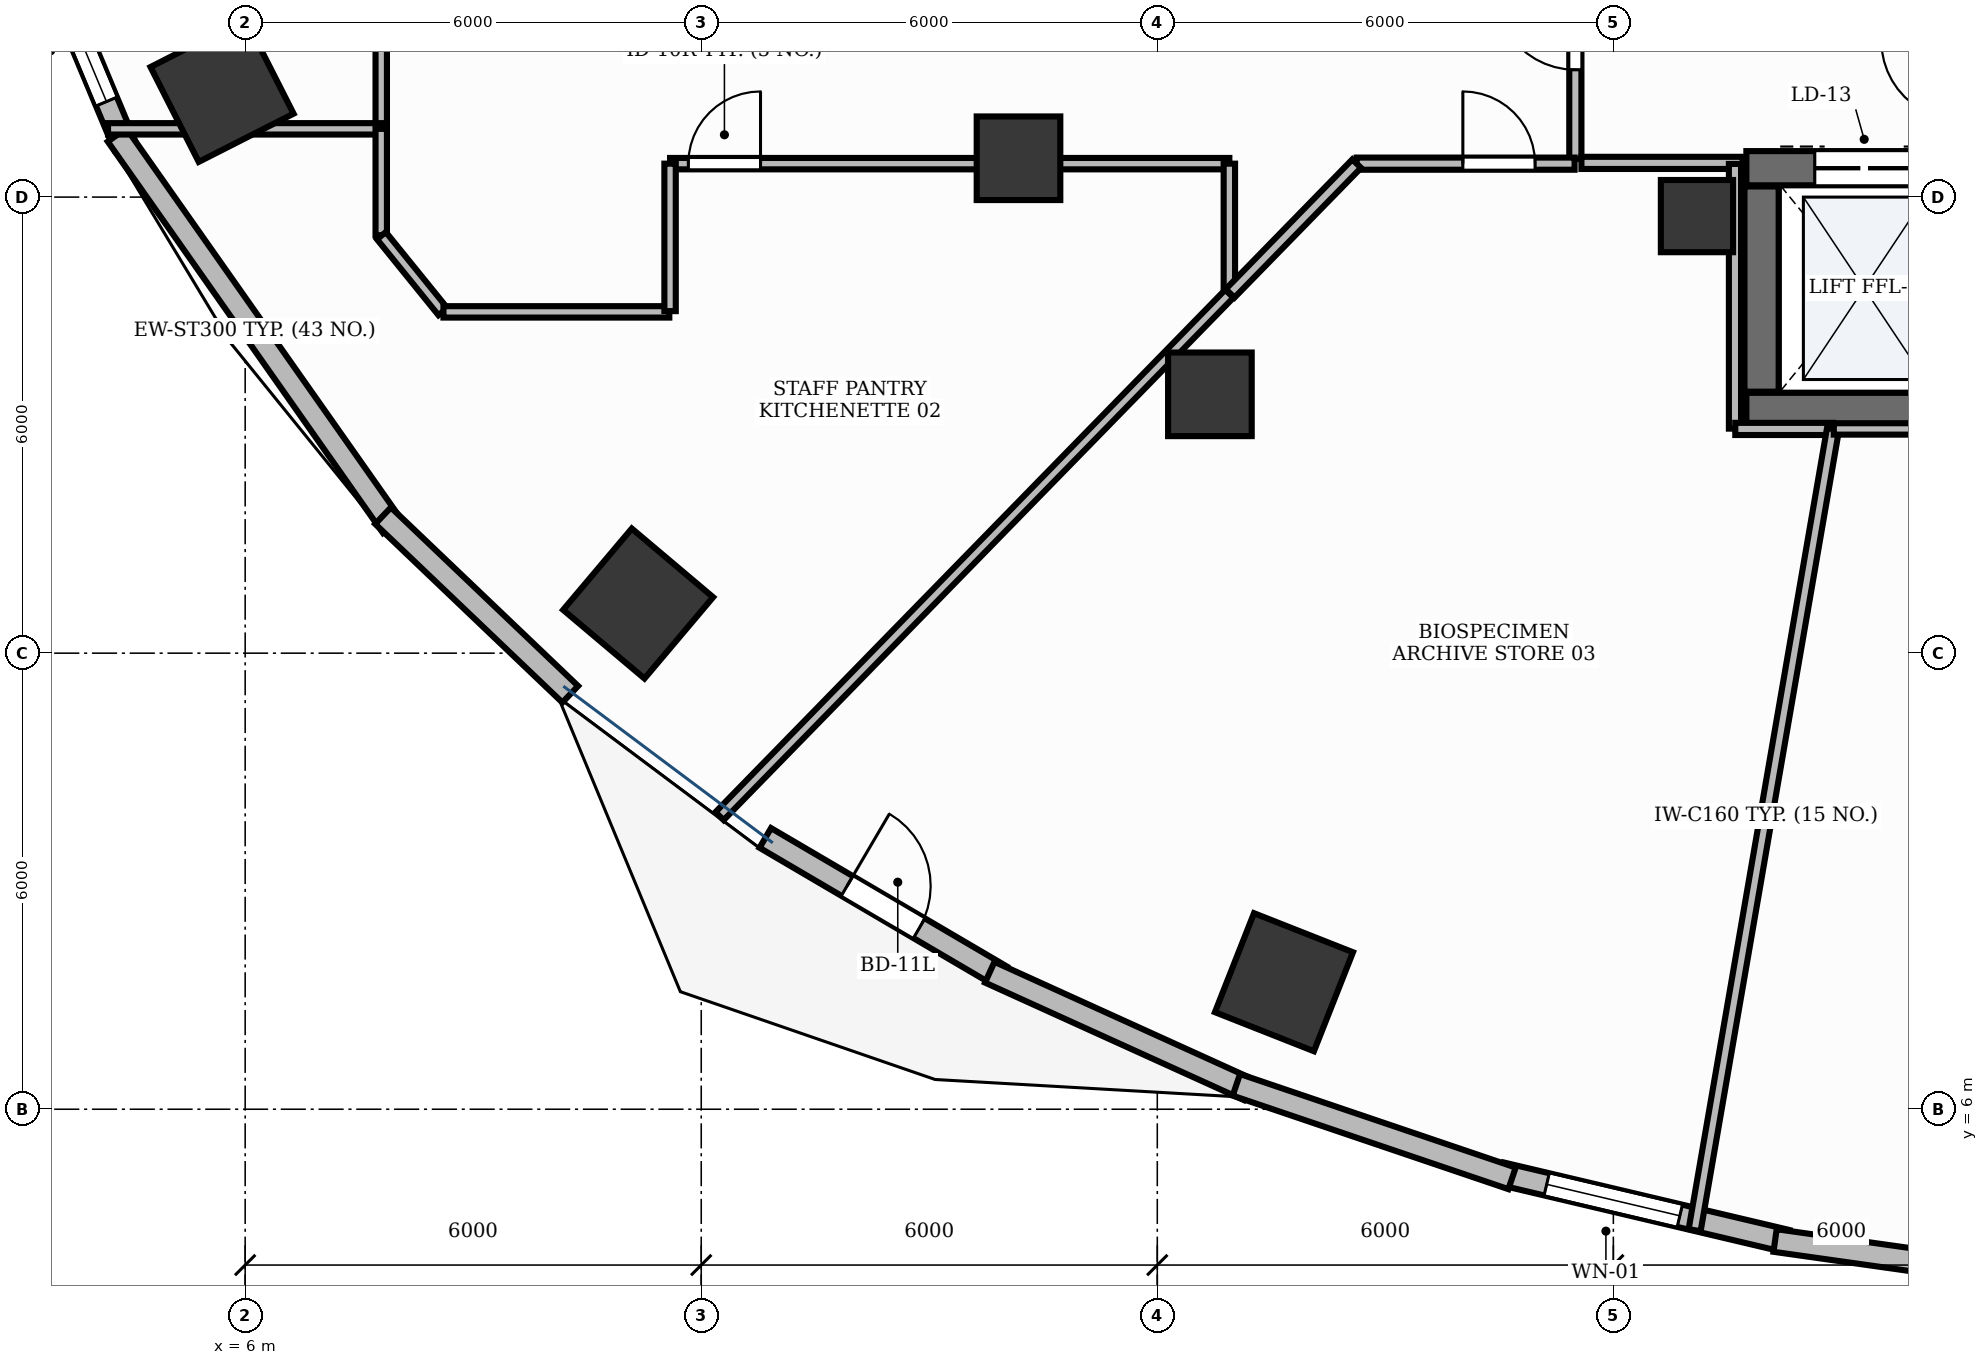
"""IFC4 building model, lengths in metres.
Left out: names, types, materials, properties, quantities, classifications, styles, units other than length and angle.
Written with IfcOpenShell. Run it as: python <this file> out.ifc"""

import sys

from ifc_helpers import new_model, si_unit, direction, frame, frame_2d, origin, origin_2d, place, context, subcontext, project, spatial, rectangle, extrude, element, fill, save


model = new_model("IFC4")
c1 = context("Model", 3, precision=1e-05, world=origin(), true_north=direction((0.0, 1.0)))
c2 = subcontext(c1, "Body", "Model", "MODEL_VIEW")
j1 = project(units=[si_unit("LENGTHUNIT", "METRE"), si_unit("PLANEANGLEUNIT", "RADIAN")], contexts=[c1])
p1 = place(None, origin())
s1 = spatial("IfcSite", under=j1, at=p1, CompositionType="ELEMENT")
p2 = place(p1, origin())
s2 = spatial("IfcBuilding", under=s1, at=p2, CompositionType="ELEMENT")
p3 = place(p2, frame((0.0, 0.0, 51.0)))
s3 = spatial("IfcBuildingStorey", under=s2, at=p3, CompositionType="ELEMENT", Elevation=51.0)
p4 = place(p3, frame((25.75, 15.2, 0.0), z_axis=(0.0, 0.0, 1.0), x_axis=(1.0, 0.0, 0.0)))
e1 = element("IfcWall", 1, at=p4, inside=s3, PredefinedType="SHEAR", context=c2, shape_type="SweptSolid", body=[
    extrude(rectangle(XDim=3.1, YDim=0.45, at=frame_2d((1.55, 0.0))), origin(), (0.0, 0.0, 1.0), 3.9),
])
p5 = place(p3, frame((25.75, 18.38, 0.0), z_axis=(0.0, 0.0, 1.0), x_axis=(1.0, 0.0, 0.0)))
e2 = element("IfcWall", 2, at=p5, inside=s3, PredefinedType="SHEAR", context=c2, shape_type="SweptSolid", body=[
    extrude(rectangle(XDim=3.1, YDim=0.45, at=frame_2d((1.55, 0.0))), origin(), (0.0, 0.0, 1.0), 3.9),
])
p6 = place(p5, frame((0.9, 0.0, 0.0)))
e3 = element("IfcOpeningElement", 3, at=p6, cuts=e2, PredefinedType="OPENING", context=c2, shape_type="SweptSolid", body=[
    extrude(rectangle(XDim=1.3, YDim=2.2, at=frame_2d((0.65, 1.1))), frame((0.0, 0.24, 0.0), z_axis=(0.0, -1.0, 0.0), x_axis=(1.0, 0.0, 0.0)), (0.0, 0.0, 1.0), 0.48),
])
p7 = place(p3, frame((25.95, 15.44, 0.0), z_axis=(0.0, 0.0, 1.0), x_axis=(0.0, 1.0, 0.0)))
e4 = element("IfcWall", 4, at=p7, inside=s3, PredefinedType="SHEAR", context=c2, shape_type="SweptSolid", body=[
    extrude(rectangle(XDim=2.7, YDim=0.45, at=frame_2d((1.35, 0.0))), origin(), (0.0, 0.0, 1.0), 3.9),
])
p8 = place(p3, frame((25.1, 17.75, -0.0), z_axis=(0.0, 0.0, 1.0), x_axis=(1.0, 0.0, 0.0)))
e5 = element("IfcColumn", 5, at=p8, inside=s3, PredefinedType="PILASTER", context=c2, shape_type="SweptSolid", body=[
    extrude(rectangle(XDim=0.95, YDim=0.95, at=origin_2d()), origin(), (0.0, 0.0, 1.0), 3.901),
])
p9 = place(p3, frame((5.696, 19.404, -0.0), z_axis=(0.0, 0.0, 1.0), x_axis=(-0.453057191132, 0.891481453292, 0.0)))
e6 = element("IfcColumn", 6, at=p9, inside=s3, PredefinedType="COLUMN", context=c2, shape_type="SweptSolid", body=[
    extrude(rectangle(XDim=1.4, YDim=1.4, at=origin_2d()), origin(), (0.0, 0.0, 1.0), 3.901),
])
p10 = place(p3, frame((16.174, 18.511, -0.0), z_axis=(0.0, 0.0, 1.0), x_axis=(1.0, 0.0, 0.0)))
e7 = element("IfcColumn", 7, at=p10, inside=s3, PredefinedType="COLUMN", context=c2, shape_type="SweptSolid", body=[
    extrude(rectangle(XDim=1.1, YDim=1.1, at=origin_2d()), origin(), (0.0, 0.0, 1.0), 3.901),
])
p11 = place(p3, frame((11.17, 12.653, -0.0), z_axis=(0.0, 0.0, 1.0), x_axis=(-0.764246456939, 0.644924300253, 0.0)))
e8 = element("IfcColumn", 8, at=p11, inside=s3, PredefinedType="COLUMN", context=c2, shape_type="SweptSolid", body=[
    extrude(rectangle(XDim=1.4, YDim=1.4, at=origin_2d()), origin(), (0.0, 0.0, 1.0), 3.901),
])
p12 = place(p3, frame((18.692, 15.405, -0.0), z_axis=(0.0, 0.0, 1.0), x_axis=(1.0, 0.0, 0.0)))
e9 = element("IfcColumn", 9, at=p12, inside=s3, PredefinedType="COLUMN", context=c2, shape_type="SweptSolid", body=[
    extrude(rectangle(XDim=1.1, YDim=1.1, at=origin_2d()), origin(), (0.0, 0.0, 1.0), 3.901),
])
p13 = place(p3, frame((19.667, 7.671, -0.0), z_axis=(0.0, 0.0, 1.0), x_axis=(-0.930225540858, 0.366988341962, 0.0)))
e10 = element("IfcColumn", 10, at=p13, inside=s3, PredefinedType="COLUMN", context=c2, shape_type="SweptSolid", body=[
    extrude(rectangle(XDim=1.4, YDim=1.4, at=origin_2d()), origin(), (0.0, 0.0, 1.0), 3.901),
])
p14 = place(p3, frame((3.24, 21.497, 0.0), z_axis=(0.0, 0.0, 1.0), x_axis=(0.385358473275, -0.92276695166, 0.0)))
e11 = element("IfcWall", 11, at=p14, inside=s3, PredefinedType="STANDARD", context=c2, shape_type="SweptSolid", body=[
    extrude(rectangle(XDim=3.056, YDim=0.3, at=frame_2d((1.528, 0.0))), origin(), (0.0, 0.0, 1.0), 3.47),
])
p15 = place(p14, frame((0.628, 0.0, 0.9)))
e12 = element("IfcOpeningElement", 12, at=p15, cuts=e11, PredefinedType="OPENING", context=c2, shape_type="SweptSolid", body=[
    extrude(rectangle(XDim=1.8, YDim=2.1, at=frame_2d((0.9, 1.05))), frame((0.0, 0.165, 0.0), z_axis=(0.0, -1.0, 0.0), x_axis=(1.0, 0.0, 0.0)), (0.0, 0.0, 1.0), 0.33),
])
p16 = place(p3, frame((12.843, 9.569, 0.0), z_axis=(0.0, 0.0, 1.0), x_axis=(0.862473134325, -0.506102847817, 0.0)))
e13 = element("IfcWall", 13, at=p16, inside=s3, PredefinedType="STANDARD", context=c2, shape_type="SweptSolid", body=[
    extrude(rectangle(XDim=3.595, YDim=0.3, at=frame_2d((1.798, 0.0))), origin(), (0.0, 0.0, 1.0), 3.9),
])
p17 = place(p16, frame((1.248, 0.0, 0.0)))
e14 = element("IfcOpeningElement", 14, at=p17, cuts=e13, PredefinedType="OPENING", context=c2, shape_type="SweptSolid", body=[
    extrude(rectangle(XDim=1.1, YDim=2.15, at=frame_2d((0.55, 1.075))), frame((0.0, 0.165, 0.0), z_axis=(0.0, -1.0, 0.0), x_axis=(1.0, 0.0, 0.0)), (0.0, 0.0, 1.0), 0.33),
])
p18 = place(p3, frame((22.525, 5.153, 0.0), z_axis=(0.0, 0.0, 1.0), x_axis=(0.973186156802, -0.230018921417, 0.0)))
e15 = element("IfcWall", 15, at=p18, inside=s3, PredefinedType="STANDARD", context=c2, shape_type="SweptSolid", body=[
    extrude(rectangle(XDim=3.861, YDim=0.3, at=frame_2d((1.931, 0.0))), origin(), (0.0, 0.0, 1.0), 3.9),
])
p19 = place(p18, frame((0.615, 0.0, 0.9)))
e16 = element("IfcOpeningElement", 16, at=p19, cuts=e15, PredefinedType="OPENING", context=c2, shape_type="SweptSolid", body=[
    extrude(rectangle(XDim=1.8, YDim=2.1, at=frame_2d((0.9, 1.05))), frame((0.0, 0.165, 0.0), z_axis=(0.0, -1.0, 0.0), x_axis=(1.0, 0.0, 0.0)), (0.0, 0.0, 1.0), 0.33),
])
p20 = place(p3, frame((4.315, 18.817, 0.0), z_axis=(0.0, 0.0, 1.0), x_axis=(0.575165804445, -0.818036855769, 0.0)))
e17 = element("IfcWall", 17, at=p20, inside=s3, PredefinedType="STANDARD", context=c2, shape_type="SweptSolid", body=[
    extrude(rectangle(XDim=6.296, YDim=0.3, at=frame_2d((3.148, 0.0))), origin(), (0.0, 0.0, 1.0), 3.9),
])
p21 = place(p3, frame((7.814, 13.808, 0.0), z_axis=(0.0, 0.0, 1.0), x_axis=(0.72369587847, -0.69011902994, 0.0)))
e18 = element("IfcWall", 18, at=p21, inside=s3, PredefinedType="STANDARD", context=c2, shape_type="SweptSolid", body=[
    extrude(rectangle(XDim=3.403, YDim=0.3, at=frame_2d((1.701, 0.0))), origin(), (0.0, 0.0, 1.0), 3.9),
])
p22 = place(p3, frame((15.796, 7.802, 0.0), z_axis=(0.0, 0.0, 1.0), x_axis=(0.910623406862, -0.413237233166, 0.0)))
e19 = element("IfcWall", 19, at=p22, inside=s3, PredefinedType="STANDARD", context=c2, shape_type="SweptSolid", body=[
    extrude(rectangle(XDim=3.74, YDim=0.3, at=frame_2d((1.87, 0.0))), origin(), (0.0, 0.0, 1.0), 3.9),
])
p23 = place(p3, frame((19.04, 6.321, 0.0), z_axis=(0.0, 0.0, 1.0), x_axis=(0.94702579403, -0.321157508773, 0.0)))
e20 = element("IfcWall", 20, at=p23, inside=s3, PredefinedType="STANDARD", context=c2, shape_type="SweptSolid", body=[
    extrude(rectangle(XDim=3.83, YDim=0.3, at=frame_2d((1.915, 0.0))), origin(), (0.0, 0.0, 1.0), 3.47),
])
p24 = place(p3, frame((26.128, 4.273, 0.0), z_axis=(0.0, 0.0, 1.0), x_axis=(0.990165832998, -0.139898617443, 0.0)))
e21 = element("IfcWall", 21, at=p24, inside=s3, PredefinedType="STANDARD", context=c2, shape_type="SweptSolid", body=[
    extrude(rectangle(XDim=3.951, YDim=0.3, at=frame_2d((1.976, 0.0))), origin(), (0.0, 0.0, 1.0), 3.47),
])
p25 = place(p3, frame((23.5, 18.5, 0.0), z_axis=(0.0, 0.0, 1.0), x_axis=(0.0, 1.0, 0.0)))
e22 = element("IfcWall", 22, at=p25, inside=s3, PredefinedType="PARTITIONING", context=c2, shape_type="SweptSolid", body=[
    extrude(rectangle(XDim=3.4, YDim=0.16, at=frame_2d((1.7, 0.0))), origin(), (0.0, 0.0, 1.0), 2.91),
])
p26 = place(p25, frame((1.175, 0.0, 0.0)))
e23 = element("IfcOpeningElement", 23, at=p26, cuts=e22, PredefinedType="OPENING", context=c2, shape_type="SweptSolid", body=[
    extrude(rectangle(XDim=1.05, YDim=2.15, at=frame_2d((0.525, 1.075))), frame((0.0, 0.095, 0.0), z_axis=(0.0, -1.0, 0.0), x_axis=(1.0, 0.0, 0.0)), (0.0, 0.0, 1.0), 0.19),
])
p27 = place(p3, frame((23.58, 18.45, 0.0), z_axis=(0.0, 0.0, 1.0), x_axis=(1.0, 0.0, 0.0)))
e24 = element("IfcWall", 24, at=p27, inside=s3, PredefinedType="PARTITIONING", context=c2, shape_type="SweptSolid", body=[
    extrude(rectangle(XDim=2.12, YDim=0.16, at=frame_2d((1.06, 0.0))), origin(), (0.0, 0.0, 1.0), 2.91),
])
p28 = place(p3, frame((11.59, 18.44, 0.0), z_axis=(0.0, 0.0, 1.0), x_axis=(1.0, 0.0, 0.0)))
e25 = element("IfcWall", 25, at=p28, inside=s3, PredefinedType="PARTITIONING", context=c2, shape_type="SweptSolid", body=[
    extrude(rectangle(XDim=7.358, YDim=0.15, at=frame_2d((3.679, 0.0))), origin(), (0.0, 0.0, 1.0), 2.91),
])
p29 = place(p28, frame((0.24, 0.0, 0.0)))
e26 = element("IfcOpeningElement", 26, at=p29, cuts=e25, PredefinedType="OPENING", context=c2, shape_type="SweptSolid", body=[
    extrude(rectangle(XDim=0.95, YDim=2.15, at=frame_2d((0.475, 1.075))), frame((0.0, 0.09, 0.0), z_axis=(0.0, -1.0, 0.0), x_axis=(1.0, 0.0, 0.0)), (0.0, 0.0, 1.0), 0.18),
])
p30 = place(p3, frame((20.623, 18.44, 0.0), z_axis=(0.0, 0.0, 1.0), x_axis=(1.0, 0.0, 0.0)))
e27 = element("IfcWall", 27, at=p30, inside=s3, PredefinedType="PARTITIONING", context=c2, shape_type="SweptSolid", body=[
    extrude(rectangle(XDim=2.867, YDim=0.16, at=frame_2d((1.434, 0.0))), origin(), (0.0, 0.0, 1.0), 2.91),
])
p31 = place(p30, frame((1.397, 0.0, 0.0)))
e28 = element("IfcOpeningElement", 28, at=p31, cuts=e27, PredefinedType="OPENING", context=c2, shape_type="SweptSolid", body=[
    extrude(rectangle(XDim=0.95, YDim=2.15, at=frame_2d((0.475, 1.075))), frame((0.0, 0.095, 0.0), z_axis=(0.0, -1.0, 0.0), x_axis=(1.0, 0.0, 0.0)), (0.0, 0.0, 1.0), 0.19),
])
p32 = place(p3, frame((7.79, 36.501, 0.0), z_axis=(0.0, 0.0, 1.0), x_axis=(0.0, -1.0, 0.0)))
e29 = element("IfcWall", 29, at=p32, inside=s3, PredefinedType="PARTITIONING", context=c2, shape_type="SweptSolid", body=[
    extrude(rectangle(XDim=17.593, YDim=0.15, at=frame_2d((8.797, 0.0))), origin(), (0.0, 0.0, 1.0), 2.91),
])
p33 = place(p32, frame((5.139, 0.0, 0.0)))
e30 = element("IfcOpeningElement", 30, at=p33, cuts=e29, PredefinedType="OPENING", context=c2, shape_type="SweptSolid", body=[
    extrude(rectangle(XDim=0.95, YDim=2.15, at=frame_2d((0.475, 1.075))), frame((0.0, 0.09, 0.0), z_axis=(0.0, -1.0, 0.0), x_axis=(1.0, 0.0, 0.0)), (0.0, 0.0, 1.0), 0.18),
])
p34 = place(p3, frame((4.196, 18.898, 0.0), z_axis=(0.0, 0.0, 1.0), x_axis=(1.0, 0.0, 0.0)))
e31 = element("IfcWall", 31, at=p34, inside=s3, PredefinedType="PARTITIONING", context=c2, shape_type="SweptSolid", body=[
    extrude(rectangle(XDim=3.594, YDim=0.15, at=frame_2d((1.797, 0.0))), origin(), (0.0, 0.0, 1.0), 2.91),
])
p35 = place(p3, frame((7.79, 18.898, 0.0), z_axis=(0.0, 0.0, 1.0), x_axis=(0.0, -1.0, 0.0)))
e32 = element("IfcWall", 32, at=p35, inside=s3, PredefinedType="PARTITIONING", context=c2, shape_type="SweptSolid", body=[
    extrude(rectangle(XDim=1.399, YDim=0.15, at=frame_2d((0.7, 0.0))), origin(), (0.0, 0.0, 1.0), 2.91),
])
p36 = place(p3, frame((7.792, 17.492, 0.0), z_axis=(0.0, 0.0, 1.0), x_axis=(0.629225554682, -0.777222748854, 0.0)))
e33 = element("IfcWall", 33, at=p36, inside=s3, PredefinedType="PARTITIONING", context=c2, shape_type="SweptSolid", body=[
    extrude(rectangle(XDim=1.285, YDim=0.15, at=frame_2d((0.643, 0.0))), origin(), (0.0, 0.0, 1.0), 2.91),
])
p37 = place(p3, frame((8.609, 16.49, 0.0), z_axis=(0.0, 0.0, 1.0), x_axis=(1.0, 0.0, 0.0)))
e34 = element("IfcWall", 34, at=p37, inside=s3, PredefinedType="PARTITIONING", context=c2, shape_type="SweptSolid", body=[
    extrude(rectangle(XDim=2.971, YDim=0.15, at=frame_2d((1.486, 0.0))), origin(), (0.0, 0.0, 1.0), 2.91),
])
p38 = place(p3, frame((11.59, 16.5, 0.0), z_axis=(0.0, 0.0, 1.0), x_axis=(0.0, 1.0, 0.0)))
e35 = element("IfcWall", 35, at=p38, inside=s3, PredefinedType="PARTITIONING", context=c2, shape_type="SweptSolid", body=[
    extrude(rectangle(XDim=1.94, YDim=0.15, at=frame_2d((0.97, 0.0))), origin(), (0.0, 0.0, 1.0), 2.91),
])
p39 = place(p3, frame((18.948, 18.44, 0.0), z_axis=(0.0, 0.0, 1.0), x_axis=(0.0, -1.0, 0.0)))
e36 = element("IfcWall", 36, at=p39, inside=s3, PredefinedType="PARTITIONING", context=c2, shape_type="SweptSolid", body=[
    extrude(rectangle(XDim=1.711, YDim=0.15, at=frame_2d((0.855, 0.0))), origin(), (0.0, 0.0, 1.0), 2.91),
])
p40 = place(p3, frame((18.948, 16.729, 0.0), z_axis=(0.0, 0.0, 1.0), x_axis=(-0.698422651091, -0.715685545783, 0.0)))
e37 = element("IfcWall", 37, at=p40, inside=s3, PredefinedType="PARTITIONING", context=c2, shape_type="SweptSolid", body=[
    extrude(rectangle(XDim=9.603, YDim=0.15, at=frame_2d((4.801, 0.0))), origin(), (0.0, 0.0, 1.0), 2.91),
])
p41 = place(p3, frame((25.6, 18.436, 0.0), z_axis=(0.0, 0.0, 1.0), x_axis=(0.0, -1.0, 0.0)))
e38 = element("IfcWall", 38, at=p41, inside=s3, PredefinedType="PARTITIONING", context=c2, shape_type="SweptSolid", body=[
    extrude(rectangle(XDim=3.482, YDim=0.16, at=frame_2d((1.741, 0.0))), origin(), (0.0, 0.0, 1.0), 2.91),
])
p42 = place(p3, frame((25.604, 14.95, 0.0), z_axis=(0.0, 0.0, 1.0), x_axis=(1.0, 0.0, 0.0)))
e39 = element("IfcWall", 39, at=p42, inside=s3, PredefinedType="PARTITIONING", context=c2, shape_type="SweptSolid", body=[
    extrude(rectangle(XDim=1.286, YDim=0.16, at=frame_2d((0.643, 0.0))), origin(), (0.0, 0.0, 1.0), 2.91),
])
p43 = place(p3, frame((26.89, 14.95, 0.0), z_axis=(0.0, 0.0, 1.0), x_axis=(-0.170210321413, -0.985407756456, 0.0)))
e40 = element("IfcWall", 40, at=p43, inside=s3, PredefinedType="PARTITIONING", context=c2, shape_type="SweptSolid", body=[
    extrude(rectangle(XDim=10.697, YDim=0.16, at=frame_2d((5.349, 0.0))), origin(), (0.0, 0.0, 1.0), 2.91),
])
p44 = place(p3, frame((18.958, 16.734, 0.0), z_axis=(0.0, 0.0, 1.0), x_axis=(0.698451817259, 0.715657081966, 0.0)))
e41 = element("IfcWall", 41, at=p44, inside=s3, PredefinedType="PARTITIONING", context=c2, shape_type="SweptSolid", body=[
    extrude(rectangle(XDim=2.384, YDim=0.16, at=frame_2d((1.192, 0.0))), origin(), (0.0, 0.0, 1.0), 2.91),
])
p45 = place(p3, frame((26.9, 14.95, 0.0), z_axis=(0.0, 0.0, 1.0), x_axis=(1.0, 0.0, 0.0)))
e42 = element("IfcWall", 42, at=p45, inside=s3, PredefinedType="PARTITIONING", context=c2, shape_type="SweptSolid", body=[
    extrude(rectangle(XDim=2.096, YDim=0.15, at=frame_2d((1.048, 0.0))), origin(), (0.0, 0.0, 1.0), 2.91),
])
p46 = place(p15, origin())
e43 = element("IfcWindow", 43, at=p46, inside=s3, PartitioningType="SINGLE_PANEL", PredefinedType="WINDOW", context=c2, shape_type="SweptSolid", body=[
    extrude(rectangle(XDim=1.8, YDim=2.1, at=frame_2d((0.9, 1.05))), frame((0.0, 0.03, 0.0), z_axis=(0.0, -1.0, 0.0), x_axis=(1.0, 0.0, 0.0)), (0.0, 0.0, 1.0), 0.06),
])
fill(e12, e43)
p47 = place(p17, origin())
e44 = element("IfcDoor", 44, at=p47, inside=s3, OperationType="SINGLE_SWING_LEFT", PredefinedType="DOOR", context=c2, shape_type="SweptSolid", body=[
    extrude(rectangle(XDim=1.1, YDim=2.15, at=frame_2d((0.55, 1.075))), frame((0.0, 0.025, 0.0), z_axis=(0.0, -1.0, 0.0), x_axis=(1.0, 0.0, 0.0)), (0.0, 0.0, 1.0), 0.05),
])
fill(e14, e44)
p48 = place(p19, origin())
e45 = element("IfcWindow", 45, at=p48, inside=s3, PartitioningType="SINGLE_PANEL", PredefinedType="WINDOW", context=c2, shape_type="SweptSolid", body=[
    extrude(rectangle(XDim=1.8, YDim=2.1, at=frame_2d((0.9, 1.05))), frame((0.0, 0.03, 0.0), z_axis=(0.0, -1.0, 0.0), x_axis=(1.0, 0.0, 0.0)), (0.0, 0.0, 1.0), 0.06),
])
fill(e16, e45)
p49 = place(p6, origin())
e46 = element("IfcDoor", 46, at=p49, inside=s3, OperationType="DOUBLE_DOOR_SLIDING", PredefinedType="DOOR", context=c2, shape_type="SweptSolid", body=[
    extrude(rectangle(XDim=1.3, YDim=2.2, at=frame_2d((0.65, 1.1))), frame((0.0, 0.025, 0.0), z_axis=(0.0, -1.0, 0.0), x_axis=(1.0, 0.0, 0.0)), (0.0, 0.0, 1.0), 0.05),
])
fill(e3, e46)
p50 = place(p26, origin())
e47 = element("IfcDoor", 47, at=p50, inside=s3, OperationType="SINGLE_SWING_RIGHT", PredefinedType="DOOR", context=c2, shape_type="SweptSolid", body=[
    extrude(rectangle(XDim=1.05, YDim=2.15, at=frame_2d((0.525, 1.075))), frame((0.0, 0.025, 0.0), z_axis=(0.0, -1.0, 0.0), x_axis=(1.0, 0.0, 0.0)), (0.0, 0.0, 1.0), 0.05),
])
fill(e23, e47)
p51 = place(p29, origin())
e48 = element("IfcDoor", 48, at=p51, inside=s3, OperationType="SINGLE_SWING_RIGHT", PredefinedType="DOOR", context=c2, shape_type="SweptSolid", body=[
    extrude(rectangle(XDim=0.95, YDim=2.15, at=frame_2d((0.475, 1.075))), frame((0.0, 0.025, 0.0), z_axis=(0.0, -1.0, 0.0), x_axis=(1.0, 0.0, 0.0)), (0.0, 0.0, 1.0), 0.05),
])
fill(e26, e48)
p52 = place(p31, origin())
e49 = element("IfcDoor", 49, at=p52, inside=s3, OperationType="SINGLE_SWING_LEFT", PredefinedType="DOOR", context=c2, shape_type="SweptSolid", body=[
    extrude(rectangle(XDim=0.95, YDim=2.15, at=frame_2d((0.475, 1.075))), frame((0.0, 0.025, 0.0), z_axis=(0.0, -1.0, 0.0), x_axis=(1.0, 0.0, 0.0)), (0.0, 0.0, 1.0), 0.05),
])
fill(e28, e49)
save(model, sys.argv[1])
